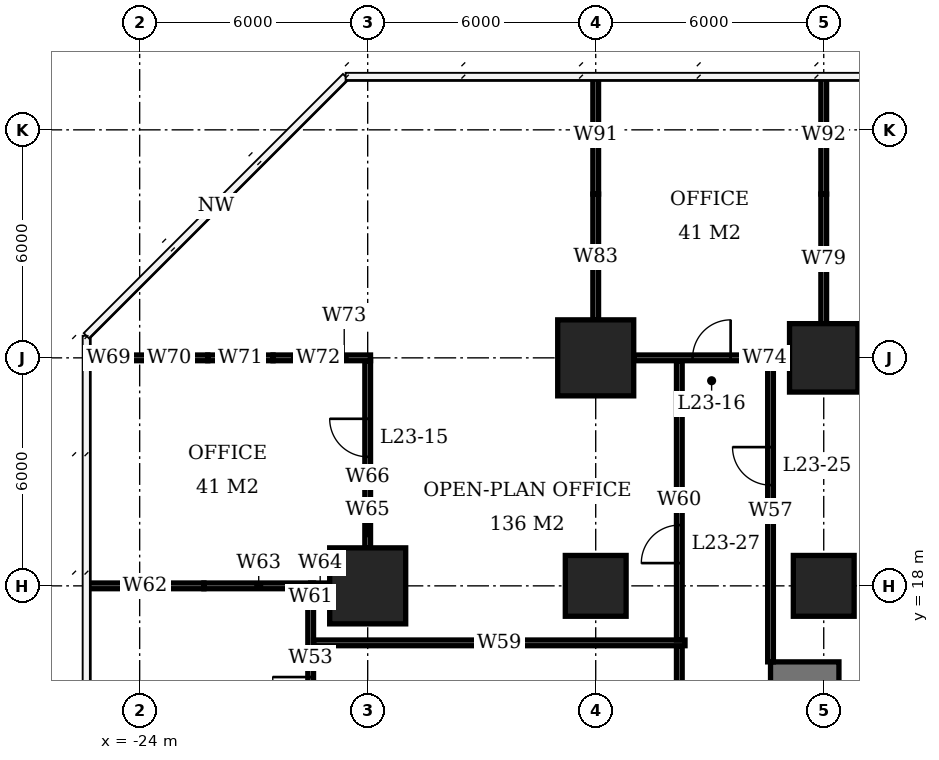
"""IFC4 building model, lengths in metres.
Left out: names, types, materials, properties, quantities, classifications, styles, units other than length and angle.
Written with IfcOpenShell. Run it as: python <this file> out.ifc"""

import sys

from ifc_helpers import new_model, si_unit, direction, frame, frame_2d, origin, origin_2d, place, context, subcontext, project, spatial, rectangle, extrude, element, fill, save


model = new_model("IFC4")
c1 = context("Model", 3, precision=1e-05, world=origin(), true_north=direction((0.0, 1.0)))
c2 = subcontext(c1, "Body", "Model", "MODEL_VIEW")
j1 = project(units=[si_unit("LENGTHUNIT", "METRE"), si_unit("PLANEANGLEUNIT", "RADIAN")], contexts=[c1])
p1 = place(None, origin())
s1 = spatial("IfcSite", under=j1, at=p1, CompositionType="ELEMENT")
p2 = place(p1, origin())
s2 = spatial("IfcBuilding", under=s1, at=p2, CompositionType="ELEMENT")
p3 = place(p2, frame((0.0, 0.0, 97.7)))
s3 = spatial("IfcBuildingStorey", under=s2, at=p3, CompositionType="ELEMENT", Elevation=97.7)
p4 = place(p3, frame((-18.0, 18.0, 0.0), z_axis=(0.0, 0.0, 1.0), x_axis=(1.0, 0.0, 0.0)))
e1 = element("IfcColumn", 1, at=p4, inside=s3, PredefinedType="COLUMN", context=c2, shape_type="SweptSolid", body=[
    extrude(rectangle(XDim=2.0, YDim=2.0, at=origin_2d()), origin(), (0.0, 0.0, 1.0), 3.9),
])
p5 = place(p3, frame((-12.0, 18.0, 0.0), z_axis=(0.0, 0.0, 1.0), x_axis=(1.0, 0.0, 0.0)))
e2 = element("IfcColumn", 2, at=p5, inside=s3, PredefinedType="COLUMN", context=c2, shape_type="SweptSolid", body=[
    extrude(rectangle(XDim=1.6, YDim=1.6, at=origin_2d()), origin(), (0.0, 0.0, 1.0), 3.9),
])
p6 = place(p3, frame((-12.0, 24.0, 0.0), z_axis=(0.0, 0.0, 1.0), x_axis=(1.0, 0.0, 0.0)))
e3 = element("IfcColumn", 3, at=p6, inside=s3, PredefinedType="COLUMN", context=c2, shape_type="SweptSolid", body=[
    extrude(rectangle(XDim=2.0, YDim=2.0, at=origin_2d()), origin(), (0.0, 0.0, 1.0), 3.9),
])
p7 = place(p3, frame((-6.0, 18.0, 0.0), z_axis=(0.0, 0.0, 1.0), x_axis=(1.0, 0.0, 0.0)))
e4 = element("IfcColumn", 4, at=p7, inside=s3, PredefinedType="COLUMN", context=c2, shape_type="SweptSolid", body=[
    extrude(rectangle(XDim=1.6, YDim=1.6, at=origin_2d()), origin(), (0.0, 0.0, 1.0), 3.9),
])
p8 = place(p3, frame((-6.0, 24.0, 0.0), z_axis=(0.0, 0.0, 1.0), x_axis=(1.0, 0.0, 0.0)))
e5 = element("IfcColumn", 5, at=p8, inside=s3, PredefinedType="COLUMN", context=c2, shape_type="SweptSolid", body=[
    extrude(rectangle(XDim=1.8, YDim=1.8, at=origin_2d()), origin(), (0.0, 0.0, 1.0), 3.9),
])
p9 = place(p3, frame((-6.5, 13.6, 0.0), z_axis=(0.0, 0.0, 1.0), x_axis=(0.0, 1.0, 0.0)))
e6 = element("IfcWall", 6, at=p9, inside=s3, PredefinedType="SHEAR", context=c2, shape_type="SweptSolid", body=[
    extrude(rectangle(XDim=2.4, YDim=1.8, at=frame_2d((1.2, 0.0))), origin(), (0.0, 0.0, 1.0), 3.9),
])
p10 = place(p3, frame((-25.4, 18.0, 0.0), z_axis=(0.0, 0.0, 1.0), x_axis=(1.0, 0.0, 0.0)))
e7 = element("IfcWall", 7, at=p10, inside=s3, PredefinedType="PARTITIONING", context=c2, shape_type="SweptSolid", body=[
    extrude(rectangle(XDim=3.09, YDim=0.15, at=frame_2d((1.545, 0.0))), origin(), (0.0, 0.0, 1.0), 3.65),
])
p11 = place(p3, frame((-22.31, 18.0, 0.0), z_axis=(0.0, 0.0, 1.0), x_axis=(1.0, 0.0, 0.0)))
e8 = element("IfcWall", 8, at=p11, inside=s3, PredefinedType="PARTITIONING", context=c2, shape_type="SweptSolid", body=[
    extrude(rectangle(XDim=2.885, YDim=0.15, at=frame_2d((1.442, 0.0))), origin(), (0.0, 0.0, 1.0), 2.65),
])
p12 = place(p3, frame((-19.5, 18.0, 0.0), z_axis=(0.0, 0.0, 1.0), x_axis=(1.0, 0.0, 0.0)))
e9 = element("IfcWall", 9, at=p12, inside=s3, PredefinedType="PARTITIONING", context=c2, shape_type="SweptSolid", body=[
    extrude(rectangle(XDim=0.5, YDim=0.15, at=frame_2d((0.25, 0.0))), origin(), (0.0, 0.0, 1.0), 2.65),
])
p13 = place(p3, frame((-25.4, 24.0, 0.0), z_axis=(0.0, 0.0, 1.0), x_axis=(1.0, 0.0, 0.0)))
e10 = element("IfcWall", 10, at=p13, inside=s3, PredefinedType="PARTITIONING", context=c2, shape_type="SweptSolid", body=[
    extrude(rectangle(XDim=1.163, YDim=0.15, at=frame_2d((0.582, 0.0))), origin(), (0.0, 0.0, 1.0), 3.65),
])
p14 = place(p3, frame((-24.237, 24.0, 0.0), z_axis=(0.0, 0.0, 1.0), x_axis=(1.0, 0.0, 0.0)))
e11 = element("IfcWall", 11, at=p14, inside=s3, PredefinedType="PARTITIONING", context=c2, shape_type="SweptSolid", body=[
    extrude(rectangle(XDim=2.029, YDim=0.15, at=frame_2d((1.015, 0.0))), origin(), (0.0, 0.0, 1.0), 2.65),
])
p15 = place(p3, frame((-22.208, 24.0, 0.0), z_axis=(0.0, 0.0, 1.0), x_axis=(1.0, 0.0, 0.0)))
e12 = element("IfcWall", 12, at=p15, inside=s3, PredefinedType="PARTITIONING", context=c2, shape_type="SweptSolid", body=[
    extrude(rectangle(XDim=1.718, YDim=0.15, at=frame_2d((0.859, 0.0))), origin(), (0.0, 0.0, 1.0), 3.65),
])
p16 = place(p3, frame((-20.49, 24.0, 0.0), z_axis=(0.0, 0.0, 1.0), x_axis=(1.0, 0.0, 0.0)))
e13 = element("IfcWall", 13, at=p16, inside=s3, PredefinedType="PARTITIONING", context=c2, shape_type="SweptSolid", body=[
    extrude(rectangle(XDim=1.18, YDim=0.15, at=frame_2d((0.59, 0.0))), origin(), (0.0, 0.0, 1.0), 2.65),
])
p17 = place(p3, frame((-19.31, 24.0, 0.0), z_axis=(0.0, 0.0, 1.0), x_axis=(1.0, 0.0, 0.0)))
e14 = element("IfcWall", 14, at=p17, inside=s3, PredefinedType="PARTITIONING", context=c2, shape_type="SweptSolid", body=[
    extrude(rectangle(XDim=1.385, YDim=0.15, at=frame_2d((0.692, 0.0))), origin(), (0.0, 0.0, 1.0), 3.65),
])
p18 = place(p3, frame((-11.0, 24.0, 0.0), z_axis=(0.0, 0.0, 1.0), x_axis=(1.0, 0.0, 0.0)))
e15 = element("IfcWall", 15, at=p18, inside=s3, PredefinedType="PARTITIONING", context=c2, shape_type="SweptSolid", body=[
    extrude(rectangle(XDim=4.1, YDim=0.15, at=frame_2d((2.05, 0.0))), origin(), (0.0, 0.0, 1.0), 3.65),
])
p19 = place(p18, frame((1.55, 0.0, 0.0)))
e16 = element("IfcOpeningElement", 16, at=p19, cuts=e15, PredefinedType="OPENING", context=c2, shape_type="SweptSolid", body=[
    extrude(rectangle(XDim=1.0, YDim=2.1, at=frame_2d((0.5, 1.05))), frame((0.0, 0.085, 0.0), z_axis=(0.0, -1.0, 0.0), x_axis=(1.0, 0.0, 0.0)), (0.0, 0.0, 1.0), 0.17),
])
p20 = place(p3, frame((-5.1, 24.0, 0.0), z_axis=(0.0, 0.0, 1.0), x_axis=(1.0, 0.0, 0.0)))
e17 = element("IfcWall", 17, at=p20, inside=s3, PredefinedType="PARTITIONING", context=c2, shape_type="SweptSolid", body=[
    extrude(rectangle(XDim=4.2, YDim=0.15, at=frame_2d((2.1, 0.0))), origin(), (0.0, 0.0, 1.0), 3.65),
])
p21 = place(p20, frame((1.6, 0.0, 0.0)))
e18 = element("IfcOpeningElement", 18, at=p21, cuts=e17, PredefinedType="OPENING", context=c2, shape_type="SweptSolid", body=[
    extrude(rectangle(XDim=1.0, YDim=2.1, at=frame_2d((0.5, 1.05))), frame((0.0, 0.085, 0.0), z_axis=(0.0, -1.0, 0.0), x_axis=(1.0, 0.0, 0.0)), (0.0, 0.0, 1.0), 0.17),
])
p22 = place(p3, frame((-19.5, 12.71, 0.0), z_axis=(0.0, 0.0, 1.0), x_axis=(0.0, 1.0, 0.0)))
e19 = element("IfcWall", 19, at=p22, inside=s3, PredefinedType="PARTITIONING", context=c2, shape_type="SweptSolid", body=[
    extrude(rectangle(XDim=4.78, YDim=0.15, at=frame_2d((2.39, 0.0))), origin(), (0.0, 0.0, 1.0), 3.65),
])
p23 = place(p22, frame((1.89, 0.0, 0.0)))
e20 = element("IfcOpeningElement", 20, at=p23, cuts=e19, PredefinedType="OPENING", context=c2, shape_type="SweptSolid", body=[
    extrude(rectangle(XDim=1.0, YDim=2.1, at=frame_2d((0.5, 1.05))), frame((0.0, 0.085, 0.0), z_axis=(0.0, -1.0, 0.0), x_axis=(1.0, 0.0, 0.0)), (0.0, 0.0, 1.0), 0.17),
])
p24 = place(p3, frame((-19.5, 17.49, 0.0), z_axis=(0.0, 0.0, 1.0), x_axis=(0.0, 1.0, 0.0)))
e21 = element("IfcWall", 21, at=p24, inside=s3, PredefinedType="PARTITIONING", context=c2, shape_type="SweptSolid", body=[
    extrude(rectangle(XDim=0.435, YDim=0.15, at=frame_2d((0.218, 0.0))), origin(), (0.0, 0.0, 1.0), 2.65),
])
p25 = place(p3, frame((-18.0, 19.0, 0.0), z_axis=(0.0, 0.0, 1.0), x_axis=(0.0, 1.0, 0.0)))
e22 = element("IfcWall", 22, at=p25, inside=s3, PredefinedType="PARTITIONING", context=c2, shape_type="SweptSolid", body=[
    extrude(rectangle(XDim=0.792, YDim=0.15, at=frame_2d((0.396, 0.0))), origin(), (0.0, 0.0, 1.0), 2.65),
])
p26 = place(p3, frame((-18.0, 19.792, 0.0), z_axis=(0.0, 0.0, 1.0), x_axis=(0.0, 1.0, 0.0)))
e23 = element("IfcWall", 23, at=p26, inside=s3, PredefinedType="PARTITIONING", context=c2, shape_type="SweptSolid", body=[
    extrude(rectangle(XDim=4.133, YDim=0.15, at=frame_2d((2.066, 0.0))), origin(), (0.0, 0.0, 1.0), 3.65),
])
p27 = place(p26, frame((1.604, 0.0, 0.0)))
e24 = element("IfcOpeningElement", 24, at=p27, cuts=e23, PredefinedType="OPENING", context=c2, shape_type="SweptSolid", body=[
    extrude(rectangle(XDim=1.0, YDim=2.1, at=frame_2d((0.5, 1.05))), frame((0.0, 0.085, 0.0), z_axis=(0.0, -1.0, 0.0), x_axis=(1.0, 0.0, 0.0)), (0.0, 0.0, 1.0), 0.17),
])
p28 = place(p3, frame((-12.0, 25.0, 0.0), z_axis=(0.0, 0.0, 1.0), x_axis=(0.0, 1.0, 0.0)))
e25 = element("IfcWall", 25, at=p28, inside=s3, PredefinedType="PARTITIONING", context=c2, shape_type="SweptSolid", body=[
    extrude(rectangle(XDim=3.31, YDim=0.15, at=frame_2d((1.655, 0.0))), origin(), (0.0, 0.0, 1.0), 2.65),
])
p29 = place(p3, frame((-12.0, 28.31, 0.0), z_axis=(0.0, 0.0, 1.0), x_axis=(0.0, 1.0, 0.0)))
e26 = element("IfcWall", 26, at=p29, inside=s3, PredefinedType="PARTITIONING", context=c2, shape_type="SweptSolid", body=[
    extrude(rectangle(XDim=3.09, YDim=0.15, at=frame_2d((1.545, 0.0))), origin(), (0.0, 0.0, 1.0), 3.65),
])
p30 = place(p3, frame((-6.0, 24.9, 0.0), z_axis=(0.0, 0.0, 1.0), x_axis=(0.0, 1.0, 0.0)))
e27 = element("IfcWall", 27, at=p30, inside=s3, PredefinedType="PARTITIONING", context=c2, shape_type="SweptSolid", body=[
    extrude(rectangle(XDim=3.41, YDim=0.15, at=frame_2d((1.705, 0.0))), origin(), (0.0, 0.0, 1.0), 2.65),
])
p31 = place(p3, frame((-6.0, 28.31, 0.0), z_axis=(0.0, 0.0, 1.0), x_axis=(0.0, 1.0, 0.0)))
e28 = element("IfcWall", 28, at=p31, inside=s3, PredefinedType="PARTITIONING", context=c2, shape_type="SweptSolid", body=[
    extrude(rectangle(XDim=3.09, YDim=0.15, at=frame_2d((1.545, 0.0))), origin(), (0.0, 0.0, 1.0), 3.65),
])
p32 = place(p3, frame((-19.425, 16.5, 0.0), z_axis=(0.0, 0.0, 1.0), x_axis=(1.0, 0.0, 0.0)))
e29 = element("IfcWall", 29, at=p32, inside=s3, PredefinedType="PARTITIONING", context=c2, shape_type="SweptSolid", body=[
    extrude(rectangle(XDim=9.775, YDim=0.15, at=frame_2d((4.888, 0.0))), origin(), (0.0, 0.0, 1.0), 3.65),
])
p33 = place(p3, frame((-9.8, 4.575, 0.0), z_axis=(0.0, 0.0, 1.0), x_axis=(0.0, 1.0, 0.0)))
e30 = element("IfcWall", 30, at=p33, inside=s3, PredefinedType="PARTITIONING", context=c2, shape_type="SweptSolid", body=[
    extrude(rectangle(XDim=11.85, YDim=0.15, at=frame_2d((5.925, 0.0))), origin(), (0.0, 0.0, 1.0), 3.65),
])
p34 = place(p33, frame((3.625, 0.0, 0.0)))
e31 = element("IfcOpeningElement", 31, at=p34, cuts=e30, PredefinedType="OPENING", context=c2, shape_type="SweptSolid", body=[
    extrude(rectangle(XDim=1.0, YDim=2.1, at=frame_2d((0.5, 1.05))), frame((0.0, 0.085, 0.0), z_axis=(0.0, -1.0, 0.0), x_axis=(1.0, 0.0, 0.0)), (0.0, 0.0, 1.0), 0.17),
])
p35 = place(p3, frame((-9.8, 16.575, 0.0), z_axis=(0.0, 0.0, 1.0), x_axis=(0.0, 1.0, 0.0)))
e32 = element("IfcWall", 32, at=p35, inside=s3, PredefinedType="PARTITIONING", context=c2, shape_type="SweptSolid", body=[
    extrude(rectangle(XDim=7.35, YDim=0.15, at=frame_2d((3.675, 0.0))), origin(), (0.0, 0.0, 1.0), 3.65),
])
p36 = place(p35, frame((2.024, 0.0, 0.0)))
e33 = element("IfcOpeningElement", 33, at=p36, cuts=e32, PredefinedType="OPENING", context=c2, shape_type="SweptSolid", body=[
    extrude(rectangle(XDim=1.0, YDim=2.1, at=frame_2d((0.5, 1.05))), frame((0.0, 0.085, 0.0), z_axis=(0.0, -1.0, 0.0), x_axis=(1.0, 0.0, 0.0)), (0.0, 0.0, 1.0), 0.17),
])
p37 = place(p3, frame((-7.4, 16.0, 0.0), z_axis=(0.0, 0.0, 1.0), x_axis=(0.0, 1.0, 0.0)))
e34 = element("IfcWall", 34, at=p37, inside=s3, PredefinedType="PARTITIONING", context=c2, shape_type="SweptSolid", body=[
    extrude(rectangle(XDim=7.925, YDim=0.15, at=frame_2d((3.962, 0.0))), origin(), (0.0, 0.0, 1.0), 3.65),
])
p38 = place(p37, frame((4.651, 0.0, 0.0)))
e35 = element("IfcOpeningElement", 35, at=p38, cuts=e34, PredefinedType="OPENING", context=c2, shape_type="SweptSolid", body=[
    extrude(rectangle(XDim=1.0, YDim=2.1, at=frame_2d((0.5, 1.05))), frame((0.0, 0.085, 0.0), z_axis=(0.0, -1.0, 0.0), x_axis=(1.0, 0.0, 0.0)), (0.0, 0.0, 1.0), 0.17),
])
p39 = place(p23, origin())
e36 = element("IfcDoor", 36, at=p39, inside=s3, OperationType="SINGLE_SWING_RIGHT", PredefinedType="DOOR", context=c2, shape_type="SweptSolid", body=[
    extrude(rectangle(XDim=1.0, YDim=2.1, at=frame_2d((0.5, 1.05))), frame((0.0, 0.025, 0.0), z_axis=(0.0, -1.0, 0.0), x_axis=(1.0, 0.0, 0.0)), (0.0, 0.0, 1.0), 0.05),
])
fill(e20, e36)
p40 = place(p27, origin())
e37 = element("IfcDoor", 37, at=p40, inside=s3, OperationType="SINGLE_SWING_RIGHT", PredefinedType="DOOR", context=c2, shape_type="SweptSolid", body=[
    extrude(rectangle(XDim=1.0, YDim=2.1, at=frame_2d((0.5, 1.05))), frame((0.0, 0.025, 0.0), z_axis=(0.0, -1.0, 0.0), x_axis=(1.0, 0.0, 0.0)), (0.0, 0.0, 1.0), 0.05),
])
fill(e24, e37)
p41 = place(p19, origin())
e38 = element("IfcDoor", 38, at=p41, inside=s3, OperationType="SINGLE_SWING_RIGHT", PredefinedType="DOOR", context=c2, shape_type="SweptSolid", body=[
    extrude(rectangle(XDim=1.0, YDim=2.1, at=frame_2d((0.5, 1.05))), frame((0.0, 0.025, 0.0), z_axis=(0.0, -1.0, 0.0), x_axis=(1.0, 0.0, 0.0)), (0.0, 0.0, 1.0), 0.05),
])
fill(e16, e38)
p42 = place(p38, origin())
e39 = element("IfcDoor", 39, at=p42, inside=s3, OperationType="SINGLE_SWING_RIGHT", PredefinedType="DOOR", context=c2, shape_type="SweptSolid", body=[
    extrude(rectangle(XDim=1.0, YDim=2.1, at=frame_2d((0.5, 1.05))), frame((0.0, 0.025, 0.0), z_axis=(0.0, -1.0, 0.0), x_axis=(1.0, 0.0, 0.0)), (0.0, 0.0, 1.0), 0.05),
])
fill(e35, e39)
p43 = place(p36, origin())
e40 = element("IfcDoor", 40, at=p43, inside=s3, OperationType="SINGLE_SWING_LEFT", PredefinedType="DOOR", context=c2, shape_type="SweptSolid", body=[
    extrude(rectangle(XDim=1.0, YDim=2.1, at=frame_2d((0.5, 1.05))), frame((0.0, 0.025, 0.0), z_axis=(0.0, -1.0, 0.0), x_axis=(1.0, 0.0, 0.0)), (0.0, 0.0, 1.0), 0.05),
])
fill(e33, e40)
save(model, sys.argv[1])
